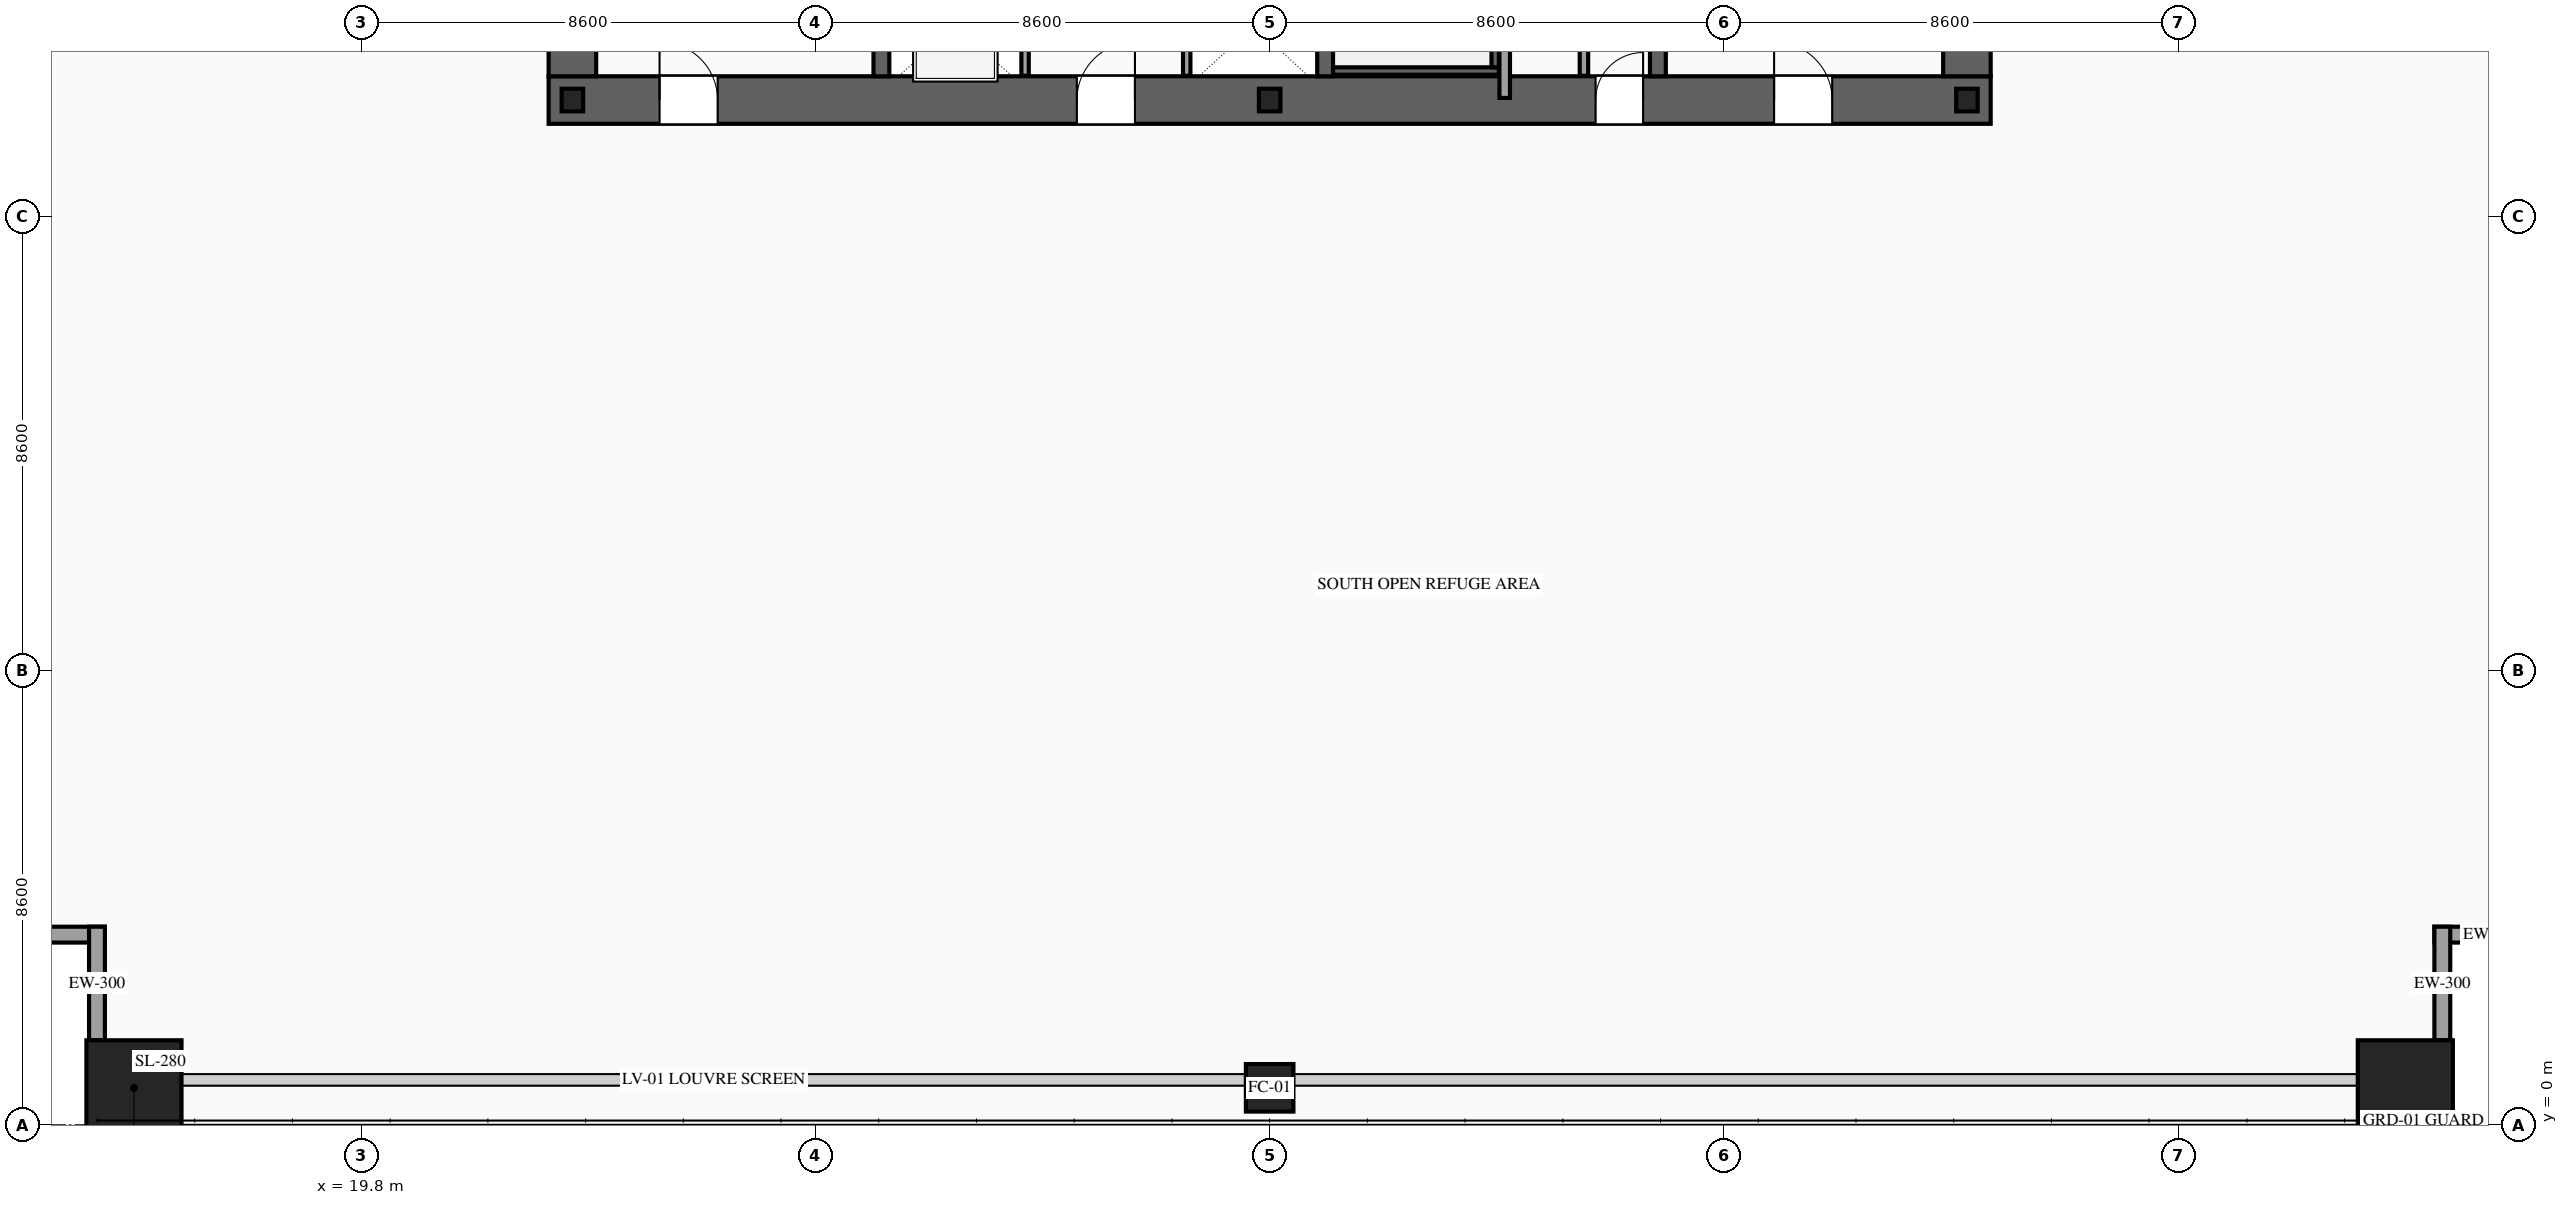
"""IFC4 building model, lengths in metres.
Left out: names, types, materials, properties, quantities, classifications, styles, units other than length and angle.
Written with IfcOpenShell. Run it as: python <this file> out.ifc"""

import sys

from ifc_helpers import new_model, si_unit, direction, frame, frame_2d, origin, origin_2d, place, context, subcontext, project, spatial, rectangle, hollow_rectangle, i_section, extrude, source, transform, mapped, element, fill, save


model = new_model("IFC4")
c1 = context("Model", 3, precision=1e-05, world=origin(), true_north=direction((0.0, 1.0)))
c2 = subcontext(c1, "Body", "Model", "MODEL_VIEW")
j1 = project(units=[si_unit("LENGTHUNIT", "METRE"), si_unit("PLANEANGLEUNIT", "RADIAN")], contexts=[c1])
p1 = place(None, origin())
s1 = spatial("IfcSite", under=j1, at=p1, CompositionType="ELEMENT")
p2 = place(p1, origin())
s2 = spatial("IfcBuilding", under=s1, at=p2, CompositionType="ELEMENT")
p3 = place(p2, frame((0.0, 0.0, 41.4)))
s3 = spatial("IfcBuildingStorey", under=s2, at=p3, CompositionType="ELEMENT", Elevation=41.4)
p4 = place(p3, frame((23.35, 19.4, 0.0), z_axis=(0.0, 0.0, 1.0), x_axis=(1.0, 0.0, 0.0)))
e1 = element("IfcWall", 1, at=p4, inside=s3, PredefinedType="SHEAR", context=c2, shape_type="SweptSolid", body=[
    extrude(rectangle(XDim=27.3, YDim=0.9, at=frame_2d((13.65, 0.0))), origin(), (0.0, 0.0, 1.0), 4.6),
])
p5 = place(p4, frame((2.1, 0.0, 0.0)))
e2 = element("IfcOpeningElement", 2, at=p5, cuts=e1, PredefinedType="OPENING", context=c2, shape_type="SweptSolid", body=[
    extrude(rectangle(XDim=1.1, YDim=2.2, at=frame_2d((0.55, 1.1))), frame((0.0, 0.465, 0.0), z_axis=(0.0, -1.0, 0.0), x_axis=(1.0, 0.0, 0.0)), (0.0, 0.0, 1.0), 0.93),
])
p6 = place(p4, frame((10.0, 0.0, 0.0)))
e3 = element("IfcOpeningElement", 3, at=p6, cuts=e1, PredefinedType="OPENING", context=c2, shape_type="SweptSolid", body=[
    extrude(rectangle(XDim=1.1, YDim=2.2, at=frame_2d((0.55, 1.1))), frame((0.0, 0.465, 0.0), z_axis=(0.0, -1.0, 0.0), x_axis=(1.0, 0.0, 0.0)), (0.0, 0.0, 1.0), 0.93),
])
p7 = place(p4, frame((23.2, 0.0, 0.0)))
e4 = element("IfcOpeningElement", 4, at=p7, cuts=e1, PredefinedType="OPENING", context=c2, shape_type="SweptSolid", body=[
    extrude(rectangle(XDim=1.1, YDim=2.2, at=frame_2d((0.55, 1.1))), frame((0.0, 0.465, 0.0), z_axis=(0.0, -1.0, 0.0), x_axis=(1.0, 0.0, 0.0)), (0.0, 0.0, 1.0), 0.93),
])
p8 = place(p4, frame((19.82, 0.0, 0.0)))
e5 = element("IfcOpeningElement", 5, at=p8, cuts=e1, PredefinedType="OPENING", context=c2, shape_type="SweptSolid", body=[
    extrude(rectangle(XDim=0.9, YDim=2.15, at=frame_2d((0.45, 1.075))), frame((0.0, 0.465, 0.0), z_axis=(0.0, -1.0, 0.0), x_axis=(1.0, 0.0, 0.0)), (0.0, 0.0, 1.0), 0.93),
])
m1 = source(origin(), c2, "Body", "SweptSolid", [
    extrude(rectangle(XDim=11.9, YDim=0.9, at=frame_2d((5.95, 0.0))), origin(), (0.0, 0.0, 1.0), 4.6),
])
for number, where, z_axis, x_axis in (
    (6, (23.8, 19.85, 0.0), (0.0, 0.0, 1.0), (0.0, 1.0, 0.0)),
    (7, (50.2, 19.85, 0.0), (0.0, 0.0, 1.0), (0.0, 1.0, 0.0)),
):
    element("IfcWall", number, at=place(p3, frame(where, z_axis=z_axis, x_axis=x_axis)), inside=s3, PredefinedType="SHEAR", context=c2, shape_type="MappedRepresentation", body=[
        mapped(m1, transform((0.0, 0.0, 0.0), scale=1.0)),
    ])
m2 = source(origin(), c2, "Body", "SweptSolid", [
    extrude(rectangle(XDim=11.9, YDim=0.3, at=frame_2d((5.95, 0.0))), origin(), (0.0, 0.0, 1.0), 4.6),
])
for number, where, z_axis, x_axis in (
    (8, (29.65, 19.85, 0.0), (0.0, 0.0, 1.0), (0.0, 1.0, 0.0)),
    (9, (38.05, 19.85, 0.0), (0.0, 0.0, 1.0), (0.0, 1.0, 0.0)),
    (10, (44.35, 19.85, 0.0), (0.0, 0.0, 1.0), (0.0, 1.0, 0.0)),
):
    element("IfcWall", number, at=place(p3, frame(where, z_axis=z_axis, x_axis=x_axis)), inside=s3, PredefinedType="SOLIDWALL", context=c2, shape_type="MappedRepresentation", body=[
        mapped(m2, transform((0.0, 0.0, 0.0), scale=1.0)),
    ])
m3 = source(origin(), c2, "Body", "SweptSolid", [
    extrude(i_section(OverallWidth=0.407, OverallDepth=0.428, WebThickness=0.02, FlangeThickness=0.035, at=origin_2d()), origin(), (0.0, 0.0, 1.0), 4.6),
])
for number, where, z_axis, x_axis in (
    (11, (23.8, 19.4, 0.0), (0.0, 0.0, 1.0), (1.0, 0.0, 0.0)),
    (12, (37.0, 19.4, 0.0), (0.0, 0.0, 1.0), (1.0, 0.0, 0.0)),
    (13, (50.2, 19.4, 0.0), (0.0, 0.0, 1.0), (1.0, 0.0, 0.0)),
):
    element("IfcColumn", number, at=place(p3, frame(where, z_axis=z_axis, x_axis=x_axis)), inside=s3, PredefinedType="COLUMN", context=c2, shape_type="MappedRepresentation", body=[
        mapped(m3, transform((0.0, 0.0, 0.0), scale=1.0)),
    ])
m4 = source(origin(), c2, "Body", "SweptSolid", [
    extrude(hollow_rectangle(XDim=1.8, YDim=1.8, WallThickness=0.08, at=origin_2d()), origin(), (0.0, 0.0, 1.0), 4.6),
])
p9 = place(p3, frame((15.5, 0.7, 0.0), z_axis=(0.0, 0.0, 1.0), x_axis=(1.0, 0.0, 0.0)))
e14 = element("IfcColumn", 14, at=p9, inside=s3, PredefinedType="COLUMN", context=c2, shape_type="MappedRepresentation", body=[
    mapped(m4, transform((0.0, 0.0, 0.0), scale=1.0)),
])
m5 = source(origin(), c2, "Body", "SweptSolid", [
    extrude(hollow_rectangle(XDim=0.9, YDim=0.9, WallThickness=0.042, at=origin_2d()), origin(), (0.0, 0.0, 1.0), 4.6),
])
p10 = place(p3, frame((37.0, 0.7, 0.0), z_axis=(0.0, 0.0, 1.0), x_axis=(1.0, 0.0, 0.0)))
e15 = element("IfcColumn", 15, at=p10, inside=s3, PredefinedType="COLUMN", context=c2, shape_type="MappedRepresentation", body=[
    mapped(m5, transform((0.0, 0.0, 0.0), scale=1.0)),
])
p11 = place(p3, frame((58.5, 0.7, 0.0), z_axis=(0.0, 0.0, 1.0), x_axis=(1.0, 0.0, 0.0)))
e16 = element("IfcColumn", 16, at=p11, inside=s3, PredefinedType="COLUMN", context=c2, shape_type="MappedRepresentation", body=[
    mapped(m4, transform((0.0, 0.0, 0.0), scale=1.0)),
])
m6 = source(origin(), c2, "Body", "SweptSolid", [
    extrude(rectangle(XDim=2.15, YDim=0.3, at=frame_2d((1.075, 0.0))), origin(), (0.0, 0.0, 1.0), 4.38),
])
for number, where, z_axis, x_axis in (
    (17, (12.8, 3.6, 0.0), (0.0, 0.0, 1.0), (1.0, 0.0, 0.0)),
    (18, (14.8, 3.75, 0.0), (0.0, 0.0, 1.0), (0.0, -1.0, 0.0)),
    (19, (59.05, 3.6, 0.0), (0.0, 0.0, 1.0), (1.0, 0.0, 0.0)),
    (20, (59.2, 1.6, 0.0), (0.0, 0.0, 1.0), (0.0, 1.0, 0.0)),
):
    element("IfcWall", number, at=place(p3, frame(where, z_axis=z_axis, x_axis=x_axis)), inside=s3, PredefinedType="SOLIDWALL", context=c2, shape_type="MappedRepresentation", body=[
        mapped(m6, transform((0.0, 0.0, 0.0), scale=1.0)),
    ])
p12 = place(p3, frame((32.37, 19.86, 0.0), z_axis=(0.0, 0.0, 1.0), x_axis=(0.0, 1.0, 0.0)))
e21 = element("IfcWall", 21, at=p12, inside=s3, PredefinedType="SOLIDWALL", context=c2, shape_type="SweptSolid", body=[
    extrude(rectangle(XDim=2.04, YDim=0.14, at=frame_2d((1.02, 0.0))), origin(), (0.0, 0.0, 1.0), 4.38),
])
p13 = place(p12, frame((0.47, 0.0, 0.0)))
e22 = element("IfcOpeningElement", 22, at=p13, cuts=e21, PredefinedType="OPENING", context=c2, shape_type="SweptSolid", body=[
    extrude(rectangle(XDim=1.1, YDim=2.2, at=frame_2d((0.55, 1.1))), frame((0.0, 0.085, 0.0), z_axis=(0.0, -1.0, 0.0), x_axis=(1.0, 0.0, 0.0)), (0.0, 0.0, 1.0), 0.17),
])
m7 = source(origin(), c2, "Body", "SweptSolid", [
    extrude(rectangle(XDim=2.04, YDim=0.14, at=frame_2d((1.02, 0.0))), origin(), (0.0, 0.0, 1.0), 4.38),
])
p14 = place(p3, frame((35.43, 19.86, 0.0), z_axis=(0.0, 0.0, 1.0), x_axis=(0.0, 1.0, 0.0)))
e23 = element("IfcWall", 23, at=p14, inside=s3, PredefinedType="SOLIDWALL", context=c2, shape_type="MappedRepresentation", body=[
    mapped(m7, transform((0.0, 0.0, 0.0), scale=1.0)),
])
m8 = source(origin(), c2, "Body", "SweptSolid", [
    extrude(rectangle(XDim=3.14, YDim=0.14, at=frame_2d((1.57, 0.0))), origin(), (0.0, 0.0, 1.0), 4.38),
])
p15 = place(p3, frame((38.2, 19.95, 0.0), z_axis=(0.0, 0.0, 1.0), x_axis=(1.0, 0.0, 0.0)))
e24 = element("IfcWall", 24, at=p15, inside=s3, PredefinedType="SOLIDWALL", context=c2, shape_type="MappedRepresentation", body=[
    mapped(m8, transform((0.0, 0.0, 0.0), scale=1.0)),
])
m9 = source(origin(), c2, "Body", "SweptSolid", [
    extrude(rectangle(XDim=8.94, YDim=0.14, at=frame_2d((4.47, 0.0))), origin(), (0.0, 0.0, 1.0), 4.38),
])
p16 = place(p3, frame((41.27, 20.02, 0.0), z_axis=(0.0, 0.0, 1.0), x_axis=(0.0, 1.0, 0.0)))
e25 = element("IfcWall", 25, at=p16, inside=s3, PredefinedType="SOLIDWALL", context=c2, shape_type="MappedRepresentation", body=[
    mapped(m9, transform((0.0, 0.0, 0.0), scale=1.0)),
])
m10 = source(origin(), c2, "Body", "SweptSolid", [
    extrude(rectangle(XDim=1.34, YDim=0.16, at=frame_2d((0.67, 0.0))), origin(), (0.0, 0.0, 1.0), 4.38),
])
p17 = place(p3, frame((42.95, 19.86, 0.0), z_axis=(0.0, 0.0, 1.0), x_axis=(0.0, 1.0, 0.0)))
e26 = element("IfcWall", 26, at=p17, inside=s3, PredefinedType="PARTITIONING", context=c2, shape_type="MappedRepresentation", body=[
    mapped(m10, transform((0.0, 0.0, 0.0), scale=1.0)),
])
m11 = source(origin(), c2, "Body", "SweptSolid", [
    extrude(rectangle(XDim=12.72, YDim=0.2, at=frame_2d((6.36, 0.0))), origin(), (0.0, 0.0, 1.0), 4.38),
])
p18 = place(p3, frame((41.45, 19.44, 0.0), z_axis=(0.0, 0.0, 1.0), x_axis=(0.0, 1.0, 0.0)))
e27 = element("IfcWall", 27, at=p18, inside=s3, PredefinedType="PARTITIONING", context=c2, shape_type="MappedRepresentation", body=[
    mapped(m11, transform((0.0, 0.0, 0.0), scale=1.0)),
])
m12 = source(origin(), c2, "Body", "SweptSolid", [
    extrude(rectangle(XDim=1.1, YDim=2.2, at=frame_2d((0.55, 1.1))), frame((0.0, 0.025, 0.0), z_axis=(0.0, -1.0, 0.0), x_axis=(1.0, 0.0, 0.0)), (0.0, 0.0, 1.0), 0.05),
])
p19 = place(p5, origin())
e28 = element("IfcDoor", 28, at=p19, inside=s3, OperationType="SINGLE_SWING_LEFT", PredefinedType="DOOR", context=c2, shape_type="MappedRepresentation", body=[
    mapped(m12, transform((0.0, 0.0, 0.0), scale=1.0)),
])
fill(e2, e28)
p20 = place(p6, origin())
e29 = element("IfcDoor", 29, at=p20, inside=s3, OperationType="SINGLE_SWING_RIGHT", PredefinedType="DOOR", context=c2, shape_type="MappedRepresentation", body=[
    mapped(m12, transform((0.0, 0.0, 0.0), scale=1.0)),
])
fill(e3, e29)
p21 = place(p7, origin())
e30 = element("IfcDoor", 30, at=p21, inside=s3, OperationType="SINGLE_SWING_LEFT", PredefinedType="DOOR", context=c2, shape_type="MappedRepresentation", body=[
    mapped(m12, transform((0.0, 0.0, 0.0), scale=1.0)),
])
fill(e4, e30)
m13 = source(origin(), c2, "Body", "SweptSolid", [
    extrude(rectangle(XDim=0.9, YDim=2.15, at=frame_2d((0.45, 1.075))), frame((0.0, 0.025, 0.0), z_axis=(0.0, -1.0, 0.0), x_axis=(1.0, 0.0, 0.0)), (0.0, 0.0, 1.0), 0.05),
])
p22 = place(p8, origin())
e31 = element("IfcDoor", 31, at=p22, inside=s3, OperationType="SINGLE_SWING_RIGHT", PredefinedType="DOOR", context=c2, shape_type="MappedRepresentation", body=[
    mapped(m13, transform((0.0, 0.0, 0.0), scale=1.0)),
])
fill(e5, e31)
save(model, sys.argv[1])
